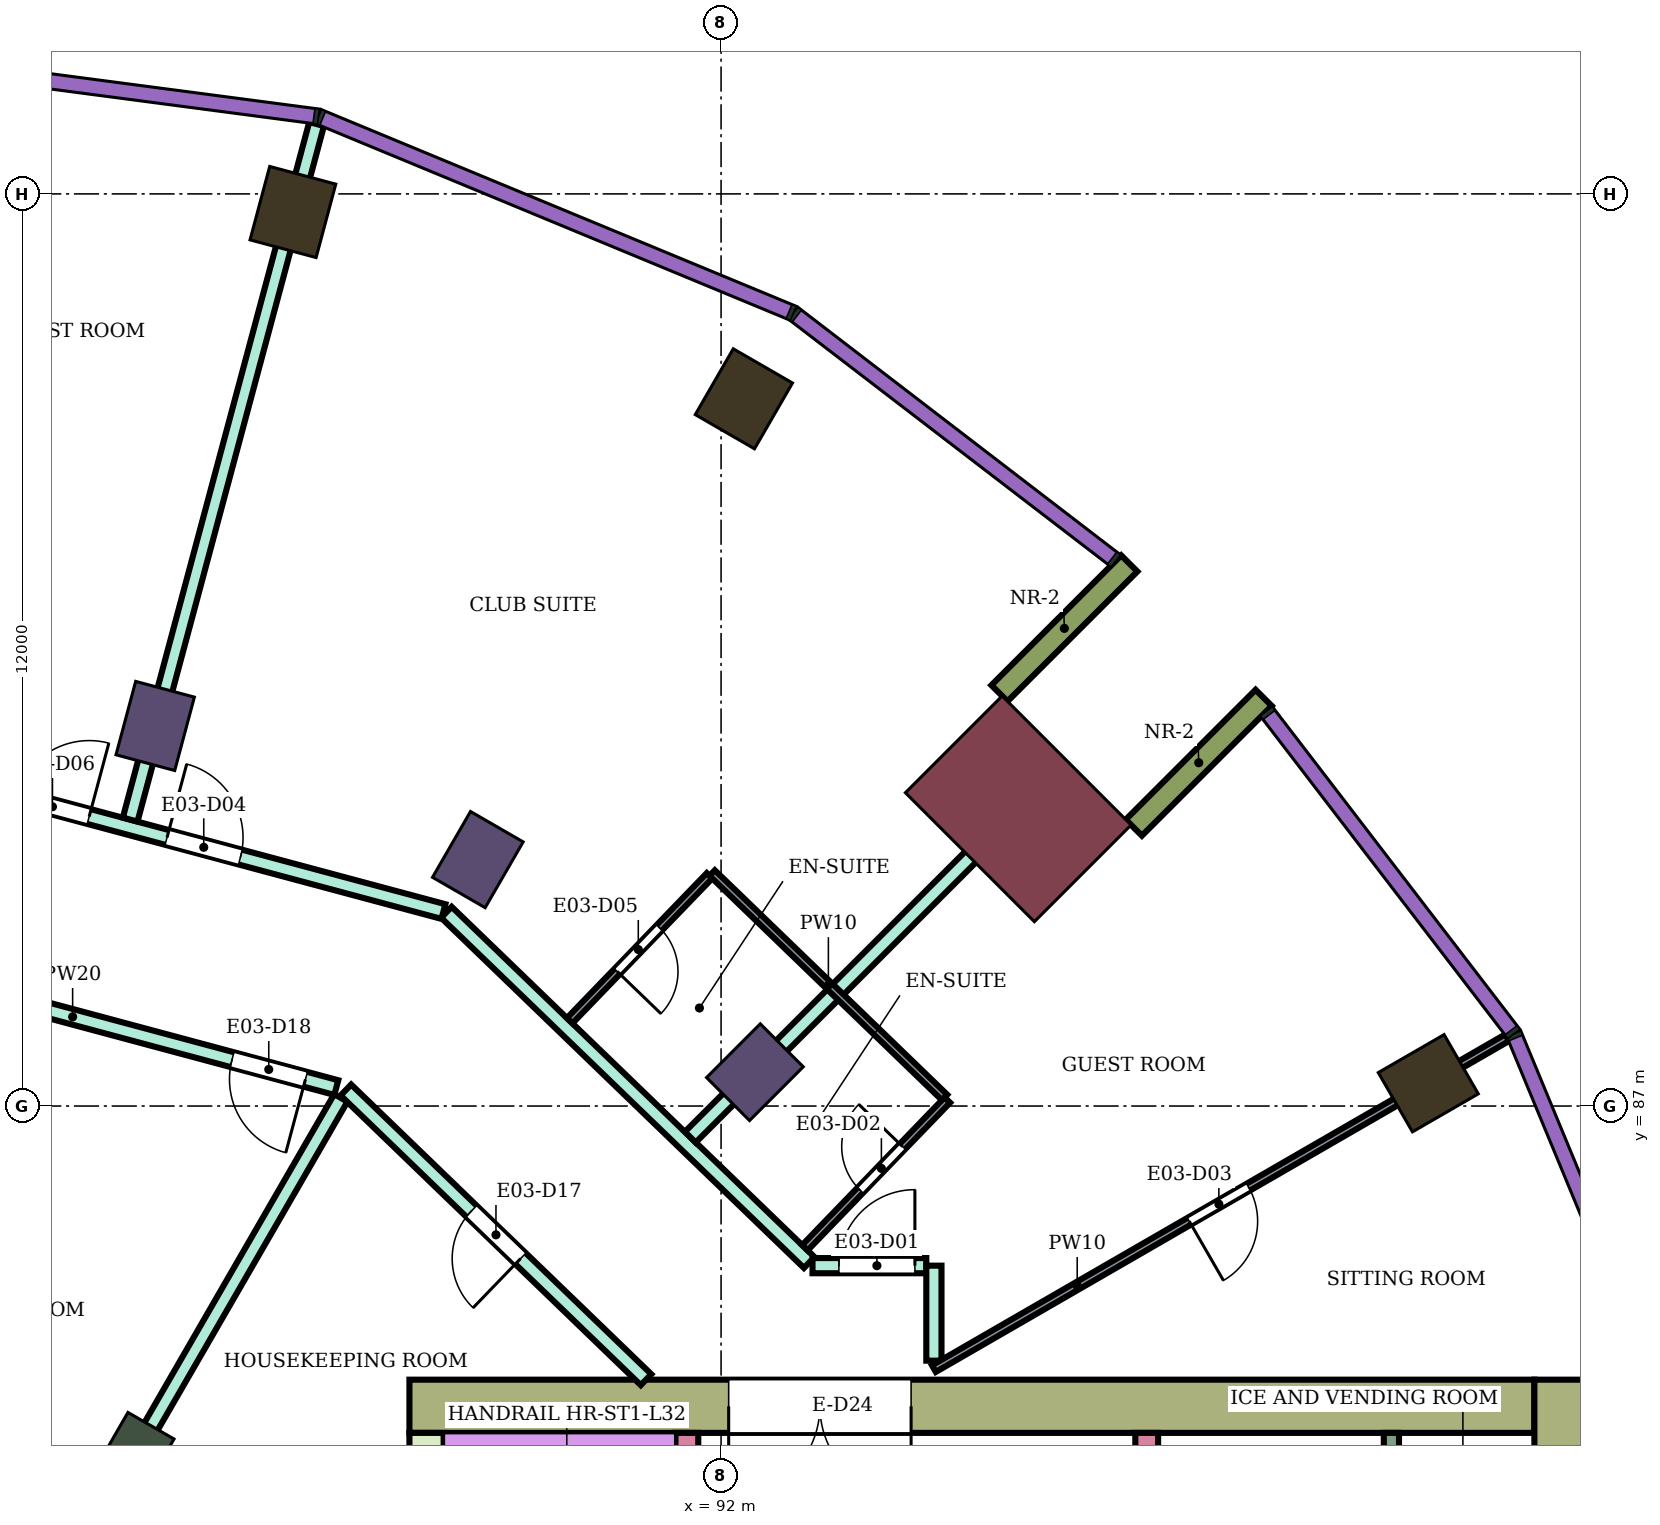
"""IFC4 building model, lengths in metres.
Left out: names, types, materials, properties, quantities, classifications, styles, units other than length and angle.
Written with IfcOpenShell. Run it as: python <this file> out.ifc"""

import sys

from ifc_helpers import new_model, si_unit, direction, frame, frame_2d, origin, origin_2d, place, context, subcontext, project, spatial, rectangle, extrude, element, fill, save


model = new_model("IFC4")
c1 = context("Model", 3, precision=1e-05, world=origin(), true_north=direction((0.0, 1.0)))
c2 = subcontext(c1, "Body", "Model", "MODEL_VIEW")
j1 = project(units=[si_unit("LENGTHUNIT", "METRE"), si_unit("PLANEANGLEUNIT", "RADIAN")], contexts=[c1])
p1 = place(None, origin())
s1 = spatial("IfcSite", under=j1, at=p1, CompositionType="ELEMENT")
p2 = place(p1, origin())
s2 = spatial("IfcBuilding", under=s1, at=p2, CompositionType="ELEMENT")
p3 = place(p2, frame((0.0, 0.0, 138.0)))
s3 = spatial("IfcBuildingStorey", under=s2, at=p3, CompositionType="ELEMENT", Elevation=138.0)
for number, where, z_axis, x_axis in (
    (1, (101.304, 87.3, 0.0), (0.0, 0.0, 1.0), (0.866, 0.5, 0.0)),
    (2, (92.3, 96.304, 0.0), (0.0, 0.0, 1.0), (0.5, 0.866, 0.0)),
    (3, (86.367, 98.762, 0.0), (0.0, 0.0, 1.0), (0.259, 0.966, 0.0)),
):
    element("IfcColumn", number, at=place(p3, frame(where, z_axis=z_axis, x_axis=x_axis)), inside=s3, PredefinedType="COLUMN", context=c2, shape_type="SweptSolid", body=[
        extrude(rectangle(XDim=1.0, YDim=0.9, at=origin_2d()), origin(), (0.0, 0.0, 1.0), 3.9),
    ])
for number, where, z_axis, x_axis in (
    (4, (92.445, 87.445, 0.0), (0.0, 0.0, 1.0), (0.707, 0.707, 0.0)),
    (5, (88.8, 90.242, 0.0), (0.0, 0.0, 1.0), (0.5, 0.866, 0.0)),
    (6, (84.555, 92.0, 0.0), (0.0, 0.0, 1.0), (0.259, 0.966, 0.0)),
):
    element("IfcColumn", number, at=place(p3, frame(where, z_axis=z_axis, x_axis=x_axis)), inside=s3, PredefinedType="COLUMN", context=c2, shape_type="SweptSolid", body=[
        extrude(rectangle(XDim=1.0, YDim=0.8, at=origin_2d()), origin(), (0.0, 0.0, 1.0), 3.9),
    ])
p4 = place(p3, frame((84.3, 82.448, 0.0), z_axis=(0.0, 0.0, 1.0), x_axis=(0.5, 0.866025403784, 0.0)))
e7 = element("IfcColumn", 7, at=p4, inside=s3, PredefinedType="COLUMN", context=c2, shape_type="SweptSolid", body=[
    extrude(rectangle(XDim=0.8, YDim=0.7, at=origin_2d()), origin(), (0.0, 0.0, 1.0), 3.9),
])
p5 = place(p3, frame((95.91, 90.91, 0.0), z_axis=(0.0, 0.0, 1.0), x_axis=(0.707106781187, 0.707106781187, 0.0)))
e8 = element("IfcColumn", 8, at=p5, inside=s3, PredefinedType="COLUMN", context=c2, shape_type="SweptSolid", body=[
    extrude(rectangle(XDim=1.8, YDim=2.4, at=origin_2d()), origin(), (0.0, 0.0, 1.0), 3.9),
])
p6 = place(p3, frame((87.9, 83.05, 0.0), z_axis=(0.0, 0.0, 1.0), x_axis=(1.0, 0.0, 0.0)))
e9 = element("IfcWall", 9, at=p6, inside=s3, PredefinedType="SHEAR", context=c2, shape_type="SweptSolid", body=[
    extrude(rectangle(XDim=14.8, YDim=0.7, at=frame_2d((7.4, 0.0))), origin(), (0.0, 0.0, 1.0), 3.58),
])
p7 = place(p6, frame((4.2, 0.0, 0.0)))
e10 = element("IfcOpeningElement", 10, at=p7, cuts=e9, PredefinedType="OPENING", context=c2, shape_type="SweptSolid", body=[
    extrude(rectangle(XDim=2.4, YDim=2.4, at=frame_2d((1.2, 1.2))), frame((0.0, 0.36, 0.0), z_axis=(0.0, -1.0, 0.0), x_axis=(1.0, 0.0, 0.0)), (0.0, 0.0, 1.0), 0.72),
])
p8 = place(p3, frame((88.125, 75.0, 0.0), z_axis=(0.0, 0.0, 1.0), x_axis=(0.0, 1.0, 0.0)))
e11 = element("IfcWall", 11, at=p8, inside=s3, PredefinedType="SHEAR", context=c2, shape_type="SweptSolid", body=[
    extrude(rectangle(XDim=7.7, YDim=0.45, at=frame_2d((3.85, 0.0))), origin(), (0.0, 0.0, 1.0), 3.58),
])
p9 = place(p3, frame((103.05, 66.6, 0.0), z_axis=(0.0, 0.0, 1.0), x_axis=(0.0, 1.0, 0.0)))
e12 = element("IfcWall", 12, at=p9, inside=s3, PredefinedType="SHEAR", context=c2, shape_type="SweptSolid", body=[
    extrude(rectangle(XDim=16.8, YDim=0.7, at=frame_2d((8.4, 0.0))), origin(), (0.0, 0.0, 1.0), 3.58),
])
p10 = place(p3, frame((91.55, 75.0, 0.0), z_axis=(0.0, 0.0, 1.0), x_axis=(0.0, 1.0, 0.0)))
e13 = element("IfcWall", 13, at=p10, inside=s3, PredefinedType="SHEAR", context=c2, shape_type="SweptSolid", body=[
    extrude(rectangle(XDim=7.7, YDim=0.3, at=frame_2d((3.85, 0.0))), origin(), (0.0, 0.0, 1.0), 3.58),
])
p11 = place(p10, frame((1.85, 0.0, 0.0)))
e14 = element("IfcOpeningElement", 14, at=p11, cuts=e13, PredefinedType="OPENING", context=c2, shape_type="SweptSolid", body=[
    extrude(rectangle(XDim=0.9, YDim=2.1, at=frame_2d((0.45, 1.05))), frame((0.0, 0.16, 0.0), z_axis=(0.0, -1.0, 0.0), x_axis=(1.0, 0.0, 0.0)), (0.0, 0.0, 1.0), 0.32),
])
p12 = place(p3, frame((97.6, 78.95, 0.0), z_axis=(0.0, 0.0, 1.0), x_axis=(0.0, 1.0, 0.0)))
e15 = element("IfcWall", 15, at=p12, inside=s3, PredefinedType="SHEAR", context=c2, shape_type="SweptSolid", body=[
    extrude(rectangle(XDim=3.75, YDim=0.3, at=frame_2d((1.875, 0.0))), origin(), (0.0, 0.0, 1.0), 3.58),
])
for number, where, z_axis, x_axis in (
    (16, (97.43, 90.662, 0.0), (0.0, 0.0, 1.0), (0.707, 0.707, 0.0)),
    (17, (95.662, 92.43, 0.0), (0.0, 0.0, 1.0), (0.707, 0.707, 0.0)),
):
    element("IfcWall", number, at=place(p3, frame(where, z_axis=z_axis, x_axis=x_axis)), inside=s3, PredefinedType="NOTDEFINED", context=c2, shape_type="SweptSolid", body=[
        extrude(rectangle(XDim=2.416, YDim=0.3, at=frame_2d((1.208, 0.0))), origin(), (0.0, 0.0, 1.0), 3.9),
    ])
p13 = place(p3, frame((83.802, 81.585, 0.0), z_axis=(0.0, 0.0, 1.0), x_axis=(-0.965933654434, 0.258789828301, 0.0)))
e18 = element("IfcWall", 18, at=p13, inside=s3, PredefinedType="NOTDEFINED", context=c2, shape_type="SweptSolid", body=[
    extrude(rectangle(XDim=3.936, YDim=0.2, at=frame_2d((1.968, 0.0))), origin(), (0.0, 0.0, 1.0), 3.9),
])
p14 = place(p13, frame((0.468, 0.0, 0.9)))
e19 = element("IfcOpeningElement", 19, at=p14, cuts=e18, PredefinedType="OPENING", context=c2, shape_type="SweptSolid", body=[
    extrude(rectangle(XDim=3.0, YDim=2.3, at=frame_2d((1.5, 1.15))), frame((0.0, 0.11, 0.0), z_axis=(0.0, -1.0, 0.0), x_axis=(1.0, 0.0, 0.0)), (0.0, 0.0, 1.0), 0.22),
])
p15 = place(p3, frame((80.0, 89.104, 0.0), z_axis=(0.0, 0.0, 1.0), x_axis=(0.965854247166, -0.25908603442, 0.0)))
e20 = element("IfcWall", 20, at=p15, inside=s3, PredefinedType="PARTITIONING", context=c2, shape_type="SweptSolid", body=[
    extrude(rectangle(XDim=7.183, YDim=0.2, at=frame_2d((3.592, 0.0))), origin(), (0.0, 0.0, 1.0), 3.45),
])
p16 = place(p15, frame((5.763, 0.0, 0.0)))
e21 = element("IfcOpeningElement", 21, at=p16, cuts=e20, PredefinedType="OPENING", context=c2, shape_type="SweptSolid", body=[
    extrude(rectangle(XDim=1.0, YDim=2.1, at=frame_2d((0.5, 1.05))), frame((0.0, 0.11, 0.0), z_axis=(0.0, -1.0, 0.0), x_axis=(1.0, 0.0, 0.0)), (0.0, 0.0, 1.0), 0.22),
])
p17 = place(p3, frame((80.0, 91.796, 0.0), z_axis=(0.0, 0.0, 1.0), x_axis=(0.965891796243, -0.258946013582, 0.0)))
e22 = element("IfcWall", 22, at=p17, inside=s3, PredefinedType="PARTITIONING", context=c2, shape_type="SweptSolid", body=[
    extrude(rectangle(XDim=8.642, YDim=0.2, at=frame_2d((4.321, 0.0))), origin(), (0.0, 0.0, 1.0), 3.45),
])
p18 = place(p17, frame((4.877, 0.0, 0.0)))
e23 = element("IfcOpeningElement", 23, at=p18, cuts=e22, PredefinedType="OPENING", context=c2, shape_type="SweptSolid", body=[
    extrude(rectangle(XDim=1.0, YDim=2.1, at=frame_2d((0.5, 1.05))), frame((0.0, 0.11, 0.0), z_axis=(0.0, -1.0, 0.0), x_axis=(1.0, 0.0, 0.0)), (0.0, 0.0, 1.0), 0.22),
])
p19 = place(p17, frame((2.817, 0.0, 0.0)))
e24 = element("IfcOpeningElement", 24, at=p19, cuts=e22, PredefinedType="OPENING", context=c2, shape_type="SweptSolid", body=[
    extrude(rectangle(XDim=1.0, YDim=2.1, at=frame_2d((0.5, 1.05))), frame((0.0, 0.11, 0.0), z_axis=(0.0, -1.0, 0.0), x_axis=(1.0, 0.0, 0.0)), (0.0, 0.0, 1.0), 0.22),
])
p20 = place(p3, frame((83.854, 81.665, 0.0), z_axis=(0.0, 0.0, 1.0), x_axis=(0.500241355856, 0.865886012066, 0.0)))
e25 = element("IfcWall", 25, at=p20, inside=s3, PredefinedType="PARTITIONING", context=c2, shape_type="SweptSolid", body=[
    extrude(rectangle(XDim=6.285, YDim=0.2, at=frame_2d((3.143, 0.0))), origin(), (0.0, 0.0, 1.0), 3.45),
])
p21 = place(p3, frame((84.226, 90.768, 0.0), z_axis=(0.0, 0.0, 1.0), x_axis=(0.258891088655, 0.965906519398, 0.0)))
e26 = element("IfcWall", 26, at=p21, inside=s3, PredefinedType="PARTITIONING", context=c2, shape_type="SweptSolid", body=[
    extrude(rectangle(XDim=9.474, YDim=0.2, at=frame_2d((4.737, 0.0))), origin(), (0.0, 0.0, 1.0), 3.45),
])
p22 = place(p3, frame((87.064, 87.211, 0.0), z_axis=(0.0, 0.0, 1.0), x_axis=(0.719562412484, -0.694427774891, 0.0)))
e27 = element("IfcWall", 27, at=p22, inside=s3, PredefinedType="PARTITIONING", context=c2, shape_type="SweptSolid", body=[
    extrude(rectangle(XDim=5.488, YDim=0.2, at=frame_2d((2.744, 0.0))), origin(), (0.0, 0.0, 1.0), 3.45),
])
p23 = place(p22, frame((2.294, 0.0, 0.0)))
e28 = element("IfcOpeningElement", 28, at=p23, cuts=e27, PredefinedType="OPENING", context=c2, shape_type="SweptSolid", body=[
    extrude(rectangle(XDim=0.9, YDim=2.1, at=frame_2d((0.45, 1.05))), frame((0.0, 0.11, 0.0), z_axis=(0.0, -1.0, 0.0), x_axis=(1.0, 0.0, 0.0)), (0.0, 0.0, 1.0), 0.22),
])
p24 = place(p3, frame((88.386, 89.549, 0.0), z_axis=(0.0, 0.0, 1.0), x_axis=(0.719507339337, -0.694484836869, 0.0)))
e29 = element("IfcWall", 29, at=p24, inside=s3, PredefinedType="PARTITIONING", context=c2, shape_type="SweptSolid", body=[
    extrude(rectangle(XDim=6.635, YDim=0.2, at=frame_2d((3.317, 0.0))), origin(), (0.0, 0.0, 1.0), 3.45),
])
p25 = place(p3, frame((91.595, 86.591, 0.0), z_axis=(0.0, 0.0, 1.0), x_axis=(0.707214399597, 0.706999146394, 0.0)))
e30 = element("IfcWall", 30, at=p25, inside=s3, PredefinedType="PARTITIONING", context=c2, shape_type="SweptSolid", body=[
    extrude(rectangle(XDim=6.805, YDim=0.2, at=frame_2d((3.403, 0.0))), origin(), (0.0, 0.0, 1.0), 3.45),
])
p26 = place(p3, frame((93.203, 84.9, 0.0), z_axis=(0.0, 0.0, 1.0), x_axis=(1.0, 0.0, 0.0)))
e31 = element("IfcWall", 31, at=p26, inside=s3, PredefinedType="PARTITIONING", context=c2, shape_type="SweptSolid", body=[
    extrude(rectangle(XDim=1.497, YDim=0.2, at=frame_2d((0.749, 0.0))), origin(), (0.0, 0.0, 1.0), 3.45),
])
p27 = place(p26, frame((0.347, 0.0, 0.0)))
e32 = element("IfcOpeningElement", 32, at=p27, cuts=e31, PredefinedType="OPENING", context=c2, shape_type="SweptSolid", body=[
    extrude(rectangle(XDim=1.0, YDim=2.1, at=frame_2d((0.5, 1.05))), frame((0.0, 0.11, 0.0), z_axis=(0.0, -1.0, 0.0), x_axis=(1.0, 0.0, 0.0)), (0.0, 0.0, 1.0), 0.22),
])
p28 = place(p3, frame((94.8, 83.65, 0.0), z_axis=(0.0, 0.0, 1.0), x_axis=(0.0, 1.0, 0.0)))
e33 = element("IfcWall", 33, at=p28, inside=s3, PredefinedType="PARTITIONING", context=c2, shape_type="SweptSolid", body=[
    extrude(rectangle(XDim=1.25, YDim=0.2, at=frame_2d((0.625, 0.0))), origin(), (0.0, 0.0, 1.0), 3.45),
])
p29 = place(p3, frame((90.008, 88.123, 0.0), z_axis=(0.0, 0.0, 1.0), x_axis=(0.694372521817, 0.719615731447, 0.0)))
e34 = element("IfcWall", 34, at=p29, inside=s3, PredefinedType="PARTITIONING", context=c2, shape_type="SweptSolid", body=[
    extrude(rectangle(XDim=2.65, YDim=0.1, at=frame_2d((1.325, 0.0))), origin(), (0.0, 0.0, 1.0), 3.45),
])
p30 = place(p29, frame((0.9, 0.0, 0.0)))
e35 = element("IfcOpeningElement", 35, at=p30, cuts=e34, PredefinedType="OPENING", context=c2, shape_type="SweptSolid", body=[
    extrude(rectangle(XDim=0.8, YDim=2.1, at=frame_2d((0.4, 1.05))), frame((0.0, 0.06, 0.0), z_axis=(0.0, -1.0, 0.0), x_axis=(1.0, 0.0, 0.0)), (0.0, 0.0, 1.0), 0.12),
])
p31 = place(p3, frame((91.883, 90.066, 0.0), z_axis=(0.0, 0.0, 1.0), x_axis=(0.719460839421, -0.694533008963, 0.0)))
e36 = element("IfcWall", 36, at=p31, inside=s3, PredefinedType="PARTITIONING", context=c2, shape_type="SweptSolid", body=[
    extrude(rectangle(XDim=4.25, YDim=0.1, at=frame_2d((2.125, 0.0))), origin(), (0.0, 0.0, 1.0), 3.45),
])
p32 = place(p3, frame((93.103, 85.136, 0.0), z_axis=(0.0, 0.0, 1.0), x_axis=(0.694287838235, 0.719697434815, 0.0)))
e37 = element("IfcWall", 37, at=p32, inside=s3, PredefinedType="PARTITIONING", context=c2, shape_type="SweptSolid", body=[
    extrude(rectangle(XDim=2.7, YDim=0.1, at=frame_2d((1.35, 0.0))), origin(), (0.0, 0.0, 1.0), 3.45),
])
p33 = place(p32, frame((1.05, 0.0, 0.0)))
e38 = element("IfcOpeningElement", 38, at=p33, cuts=e37, PredefinedType="OPENING", context=c2, shape_type="SweptSolid", body=[
    extrude(rectangle(XDim=0.8, YDim=2.1, at=frame_2d((0.4, 1.05))), frame((0.0, 0.06, 0.0), z_axis=(0.0, -1.0, 0.0), x_axis=(1.0, 0.0, 0.0)), (0.0, 0.0, 1.0), 0.12),
])
p34 = place(p3, frame((94.8, 83.545, 0.0), z_axis=(0.0, 0.0, 1.0), x_axis=(0.86602264145, 0.500004784474, 0.0)))
e39 = element("IfcWall", 39, at=p34, inside=s3, PredefinedType="PARTITIONING", context=c2, shape_type="SweptSolid", body=[
    extrude(rectangle(XDim=8.708, YDim=0.1, at=frame_2d((4.354, 0.0))), origin(), (0.0, 0.0, 1.0), 3.45),
])
p35 = place(p34, frame((3.879, 0.0, 0.0)))
e40 = element("IfcOpeningElement", 40, at=p35, cuts=e39, PredefinedType="OPENING", context=c2, shape_type="SweptSolid", body=[
    extrude(rectangle(XDim=0.9, YDim=2.1, at=frame_2d((0.45, 1.05))), frame((0.0, 0.06, 0.0), z_axis=(0.0, -1.0, 0.0), x_axis=(1.0, 0.0, 0.0)), (0.0, 0.0, 1.0), 0.12),
])
p36 = place(p3, frame((100.819, 79.25, 0.0), z_axis=(0.0, 0.0, 1.0), x_axis=(0.0, 1.0, 0.0)))
e41 = element("IfcWall", 41, at=p36, inside=s3, PredefinedType="PARTITIONING", context=c2, shape_type="SweptSolid", body=[
    extrude(rectangle(XDim=3.45, YDim=0.2, at=frame_2d((1.725, 0.0))), origin(), (0.0, 0.0, 1.0), 3.58),
])
p37 = place(p27, origin())
e42 = element("IfcDoor", 42, at=p37, inside=s3, OperationType="SINGLE_SWING_RIGHT", PredefinedType="DOOR", context=c2, shape_type="SweptSolid", body=[
    extrude(rectangle(XDim=1.0, YDim=2.1, at=frame_2d((0.5, 1.05))), frame((0.0, 0.025, 0.0), z_axis=(0.0, -1.0, 0.0), x_axis=(1.0, 0.0, 0.0)), (0.0, 0.0, 1.0), 0.05),
])
fill(e32, e42)
p38 = place(p33, origin())
e43 = element("IfcDoor", 43, at=p38, inside=s3, OperationType="SINGLE_SWING_RIGHT", PredefinedType="DOOR", context=c2, shape_type="SweptSolid", body=[
    extrude(rectangle(XDim=0.8, YDim=2.1, at=frame_2d((0.4, 1.05))), frame((0.0, 0.025, 0.0), z_axis=(0.0, -1.0, 0.0), x_axis=(1.0, 0.0, 0.0)), (0.0, 0.0, 1.0), 0.05),
])
fill(e38, e43)
p39 = place(p35, frame((0.9, 0.0, 0.0), z_axis=(0.0, 0.0, 1.0), x_axis=(-1.0, 0.0, 0.0)))
e44 = element("IfcDoor", 44, at=p39, inside=s3, OperationType="SINGLE_SWING_RIGHT", PredefinedType="DOOR", context=c2, shape_type="SweptSolid", body=[
    extrude(rectangle(XDim=0.9, YDim=2.1, at=frame_2d((0.45, 1.05))), frame((0.0, 0.025, 0.0), z_axis=(0.0, -1.0, 0.0), x_axis=(1.0, 0.0, 0.0)), (0.0, 0.0, 1.0), 0.05),
])
fill(e40, e44)
p40 = place(p18, origin())
e45 = element("IfcDoor", 45, at=p40, inside=s3, OperationType="SINGLE_SWING_LEFT", PredefinedType="DOOR", context=c2, shape_type="SweptSolid", body=[
    extrude(rectangle(XDim=1.0, YDim=2.1, at=frame_2d((0.5, 1.05))), frame((0.0, 0.025, 0.0), z_axis=(0.0, -1.0, 0.0), x_axis=(1.0, 0.0, 0.0)), (0.0, 0.0, 1.0), 0.05),
])
fill(e23, e45)
p41 = place(p30, frame((0.8, 0.0, 0.0), z_axis=(0.0, 0.0, 1.0), x_axis=(-1.0, 0.0, 0.0)))
e46 = element("IfcDoor", 46, at=p41, inside=s3, OperationType="SINGLE_SWING_RIGHT", PredefinedType="DOOR", context=c2, shape_type="SweptSolid", body=[
    extrude(rectangle(XDim=0.8, YDim=2.1, at=frame_2d((0.4, 1.05))), frame((0.0, 0.025, 0.0), z_axis=(0.0, -1.0, 0.0), x_axis=(1.0, 0.0, 0.0)), (0.0, 0.0, 1.0), 0.05),
])
fill(e35, e46)
p42 = place(p19, origin())
e47 = element("IfcDoor", 47, at=p42, inside=s3, OperationType="SINGLE_SWING_RIGHT", PredefinedType="DOOR", context=c2, shape_type="SweptSolid", body=[
    extrude(rectangle(XDim=1.0, YDim=2.1, at=frame_2d((0.5, 1.05))), frame((0.0, 0.025, 0.0), z_axis=(0.0, -1.0, 0.0), x_axis=(1.0, 0.0, 0.0)), (0.0, 0.0, 1.0), 0.05),
])
fill(e24, e47)
p43 = place(p23, frame((0.9, 0.0, 0.0), z_axis=(0.0, 0.0, 1.0), x_axis=(-1.0, 0.0, 0.0)))
e48 = element("IfcDoor", 48, at=p43, inside=s3, OperationType="SINGLE_SWING_LEFT", PredefinedType="DOOR", context=c2, shape_type="SweptSolid", body=[
    extrude(rectangle(XDim=0.9, YDim=2.1, at=frame_2d((0.45, 1.05))), frame((0.0, 0.025, 0.0), z_axis=(0.0, -1.0, 0.0), x_axis=(1.0, 0.0, 0.0)), (0.0, 0.0, 1.0), 0.05),
])
fill(e28, e48)
p44 = place(p16, frame((1.0, 0.0, 0.0), z_axis=(0.0, 0.0, 1.0), x_axis=(-1.0, 0.0, 0.0)))
e49 = element("IfcDoor", 49, at=p44, inside=s3, OperationType="SINGLE_SWING_LEFT", PredefinedType="DOOR", context=c2, shape_type="SweptSolid", body=[
    extrude(rectangle(XDim=1.0, YDim=2.1, at=frame_2d((0.5, 1.05))), frame((0.0, 0.025, 0.0), z_axis=(0.0, -1.0, 0.0), x_axis=(1.0, 0.0, 0.0)), (0.0, 0.0, 1.0), 0.05),
])
fill(e21, e49)
p45 = place(p7, frame((2.4, 0.0, 0.0), z_axis=(0.0, 0.0, 1.0), x_axis=(-1.0, 0.0, 0.0)))
e50 = element("IfcDoor", 50, at=p45, inside=s3, OperationType="DOUBLE_DOOR_SINGLE_SWING", PredefinedType="DOOR", context=c2, shape_type="SweptSolid", body=[
    extrude(rectangle(XDim=2.4, YDim=2.4, at=frame_2d((1.2, 1.2))), frame((0.0, 0.025, 0.0), z_axis=(0.0, -1.0, 0.0), x_axis=(1.0, 0.0, 0.0)), (0.0, 0.0, 1.0), 0.05),
])
fill(e10, e50)
save(model, sys.argv[1])
